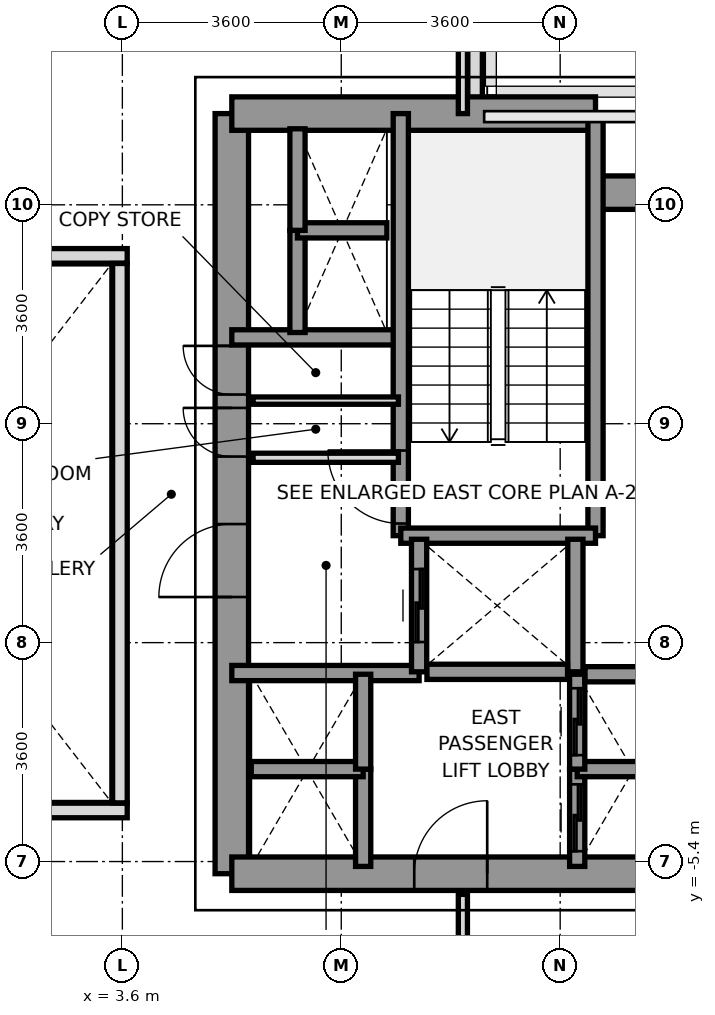
"""IFC4 building model, lengths in metres.
Left out: names, types, materials, properties, quantities, classifications, styles, units other than length and angle.
Written with IfcOpenShell. Run it as: python <this file> out.ifc"""

import sys

from ifc_helpers import new_model, si_unit, direction, frame, frame_2d, origin, place, context, subcontext, project, spatial, rectangle, extrude, source, transform, mapped, element, fill, save


model = new_model("IFC4")
c1 = context("Model", 3, precision=1e-05, world=origin(), true_north=direction((0.0, 1.0)))
c2 = subcontext(c1, "Body", "Model", "MODEL_VIEW")
j1 = project(units=[si_unit("LENGTHUNIT", "METRE"), si_unit("PLANEANGLEUNIT", "RADIAN")], contexts=[c1])
p1 = place(None, origin())
s1 = spatial("IfcSite", under=j1, at=p1, CompositionType="ELEMENT")
p2 = place(p1, origin())
s2 = spatial("IfcBuilding", under=s1, at=p2, CompositionType="ELEMENT")
p3 = place(p2, frame((0.0, 0.0, 57.8)))
s3 = spatial("IfcBuildingStorey", under=s2, at=p3, CompositionType="ELEMENT", Elevation=57.8)
p4 = place(p3, frame((9.4, 8.397, 0.0), z_axis=(0.0, 0.0, 1.0), x_axis=(0.0, -1.0, 0.0)))
e1 = element("IfcWall", 1, at=p4, inside=s3, PredefinedType="PARAPET", context=c2, shape_type="SweptSolid", body=[
    extrude(rectangle(XDim=1.444, YDim=0.24, at=frame_2d((0.722, 0.0))), origin(), (0.0, 0.0, 1.0), 1.15),
])
p5 = place(p3, frame((5.4, -5.6, 0.0), z_axis=(0.0, 0.0, 1.0), x_axis=(0.0, 1.0, 0.0)))
e2 = element("IfcWall", 2, at=p5, inside=s3, PredefinedType="SHEAR", context=c2, shape_type="SweptSolid", body=[
    extrude(rectangle(XDim=12.5, YDim=0.55, at=frame_2d((6.25, 0.0))), origin(), (0.0, 0.0, 1.0), 3.2),
])
p6 = place(p5, frame((4.55, 0.0, 0.0)))
e3 = element("IfcOpeningElement", 3, at=p6, cuts=e2, PredefinedType="OPENING", context=c2, shape_type="SweptSolid", body=[
    extrude(rectangle(XDim=1.2, YDim=2.2, at=frame_2d((0.6, 1.1))), frame((0.0, 0.285, 0.0), z_axis=(0.0, -1.0, 0.0), x_axis=(1.0, 0.0, 0.0)), (0.0, 0.0, 1.0), 0.57),
])
p7 = place(p5, frame((6.86, 0.0, 0.0)))
e4 = element("IfcOpeningElement", 4, at=p7, cuts=e2, PredefinedType="OPENING", context=c2, shape_type="SweptSolid", body=[
    extrude(rectangle(XDim=0.8, YDim=2.1, at=frame_2d((0.4, 1.05))), frame((0.0, 0.285, 0.0), z_axis=(0.0, -1.0, 0.0), x_axis=(1.0, 0.0, 0.0)), (0.0, 0.0, 1.0), 0.57),
])
p8 = place(p5, frame((7.88, 0.0, 0.0)))
e5 = element("IfcOpeningElement", 5, at=p8, cuts=e2, PredefinedType="OPENING", context=c2, shape_type="SweptSolid", body=[
    extrude(rectangle(XDim=0.8, YDim=2.1, at=frame_2d((0.4, 1.05))), frame((0.0, 0.285, 0.0), z_axis=(0.0, -1.0, 0.0), x_axis=(1.0, 0.0, 0.0)), (0.0, 0.0, 1.0), 0.57),
])
p9 = place(p3, frame((5.4, 6.9, 0.0), z_axis=(0.0, 0.0, 1.0), x_axis=(1.0, 0.0, 0.0)))
e6 = element("IfcWall", 6, at=p9, inside=s3, PredefinedType="SHEAR", context=c2, shape_type="SweptSolid", body=[
    extrude(rectangle(XDim=5.981, YDim=0.55, at=frame_2d((2.991, 0.0))), origin(), (0.0, 0.0, 1.0), 3.2),
])
p10 = place(p3, frame((11.381, 5.6, 0.0), z_axis=(0.0, 0.0, 1.0), x_axis=(1.0, 0.0, 0.0)))
e7 = element("IfcWall", 7, at=p10, inside=s3, PredefinedType="SHEAR", context=c2, shape_type="SweptSolid", body=[
    extrude(rectangle(XDim=1.819, YDim=0.55, at=frame_2d((0.909, 0.0))), origin(), (0.0, 0.0, 1.0), 3.2),
])
p11 = place(p3, frame((5.4, -5.6, 0.0), z_axis=(0.0, 0.0, 1.0), x_axis=(1.0, 0.0, 0.0)))
e8 = element("IfcWall", 8, at=p11, inside=s3, PredefinedType="SHEAR", context=c2, shape_type="SweptSolid", body=[
    extrude(rectangle(XDim=7.8, YDim=0.55, at=frame_2d((3.9, 0.0))), origin(), (0.0, 0.0, 1.0), 3.2),
])
p12 = place(p11, frame((3.0, 0.0, 0.0)))
e9 = element("IfcOpeningElement", 9, at=p12, cuts=e8, PredefinedType="OPENING", context=c2, shape_type="SweptSolid", body=[
    extrude(rectangle(XDim=1.2, YDim=2.2, at=frame_2d((0.6, 1.1))), frame((0.0, 0.285, 0.0), z_axis=(0.0, -1.0, 0.0), x_axis=(1.0, 0.0, 0.0)), (0.0, 0.0, 1.0), 0.57),
])
p13 = place(p3, frame((5.4, 3.22, 0.0), z_axis=(0.0, 0.0, 1.0), x_axis=(1.0, 0.0, 0.0)))
e10 = element("IfcWall", 10, at=p13, inside=s3, PredefinedType="SOLIDWALL", context=c2, shape_type="SweptSolid", body=[
    extrude(rectangle(XDim=2.78, YDim=0.25, at=frame_2d((1.39, 0.0))), origin(), (0.0, 0.0, 1.0), 3.2),
])
p14 = place(p3, frame((5.4, -2.3, 0.0), z_axis=(0.0, 0.0, 1.0), x_axis=(1.0, 0.0, 0.0)))
e11 = element("IfcWall", 11, at=p14, inside=s3, PredefinedType="SOLIDWALL", context=c2, shape_type="SweptSolid", body=[
    extrude(rectangle(XDim=3.08, YDim=0.25, at=frame_2d((1.54, 0.0))), origin(), (0.0, 0.0, 1.0), 3.2),
])
p15 = place(p3, frame((8.179, -0.041, 0.0), z_axis=(0.0, 0.0, 1.0), x_axis=(0.0, 1.0, 0.0)))
e12 = element("IfcWall", 12, at=p15, inside=s3, PredefinedType="SOLIDWALL", context=c2, shape_type="SweptSolid", body=[
    extrude(rectangle(XDim=6.941, YDim=0.25, at=frame_2d((3.47, 0.0))), origin(), (0.0, 0.0, 1.0), 3.2),
])
p16 = place(p15, frame((0.2, 0.0, 0.0)))
e13 = element("IfcOpeningElement", 13, at=p16, cuts=e12, PredefinedType="OPENING", context=c2, shape_type="SweptSolid", body=[
    extrude(rectangle(XDim=1.2, YDim=2.2, at=frame_2d((0.6, 1.1))), frame((0.0, 0.135, 0.0), z_axis=(0.0, -1.0, 0.0), x_axis=(1.0, 0.0, 0.0)), (0.0, 0.0, 1.0), 0.27),
])
p17 = place(p3, frame((11.381, -0.041, 0.0), z_axis=(0.0, 0.0, 1.0), x_axis=(0.0, 1.0, 0.0)))
e14 = element("IfcWall", 14, at=p17, inside=s3, PredefinedType="SOLIDWALL", context=c2, shape_type="SweptSolid", body=[
    extrude(rectangle(XDim=6.941, YDim=0.25, at=frame_2d((3.47, 0.0))), origin(), (0.0, 0.0, 1.0), 3.2),
])
p18 = place(p3, frame((8.179, -0.041, 0.0), z_axis=(0.0, 0.0, 1.0), x_axis=(1.0, 0.0, 0.0)))
e15 = element("IfcWall", 15, at=p18, inside=s3, PredefinedType="SOLIDWALL", context=c2, shape_type="SweptSolid", body=[
    extrude(rectangle(XDim=3.202, YDim=0.25, at=frame_2d((1.601, 0.0))), origin(), (0.0, 0.0, 1.0), 3.2),
])
p19 = place(p3, frame((8.48, -2.28, 0.0), z_axis=(0.0, 0.0, 1.0), x_axis=(0.0, 1.0, 0.0)))
e16 = element("IfcWall", 16, at=p19, inside=s3, PredefinedType="SOLIDWALL", context=c2, shape_type="SweptSolid", body=[
    extrude(rectangle(XDim=2.18, YDim=0.25, at=frame_2d((1.09, 0.0))), origin(), (0.0, 0.0, 1.0), 3.2),
])
p20 = place(p19, frame((0.49, 0.0, 0.0)))
e17 = element("IfcOpeningElement", 17, at=p20, cuts=e16, PredefinedType="OPENING", context=c2, shape_type="SweptSolid", body=[
    extrude(rectangle(XDim=1.2, YDim=2.2, at=frame_2d((0.6, 1.1))), frame((0.0, 0.135, 0.0), z_axis=(0.0, -1.0, 0.0), x_axis=(1.0, 0.0, 0.0)), (0.0, 0.0, 1.0), 0.27),
])
p21 = place(p3, frame((11.05, -2.28, 0.0), z_axis=(0.0, 0.0, 1.0), x_axis=(0.0, 1.0, 0.0)))
e18 = element("IfcWall", 18, at=p21, inside=s3, PredefinedType="SOLIDWALL", context=c2, shape_type="SweptSolid", body=[
    extrude(rectangle(XDim=2.18, YDim=0.25, at=frame_2d((1.09, 0.0))), origin(), (0.0, 0.0, 1.0), 3.2),
])
p22 = place(p3, frame((8.609, -2.28, 0.0), z_axis=(0.0, 0.0, 1.0), x_axis=(1.0, 0.0, 0.0)))
e19 = element("IfcWall", 19, at=p22, inside=s3, PredefinedType="SOLIDWALL", context=c2, shape_type="SweptSolid", body=[
    extrude(rectangle(XDim=2.312, YDim=0.25, at=frame_2d((1.156, 0.0))), origin(), (0.0, 0.0, 1.0), 3.2),
])
p23 = place(p3, frame((11.08, -5.48, 0.0), z_axis=(0.0, 0.0, 1.0), x_axis=(0.0, 1.0, 0.0)))
e20 = element("IfcWall", 20, at=p23, inside=s3, PredefinedType="SOLIDWALL", context=c2, shape_type="SweptSolid", body=[
    extrude(rectangle(XDim=1.6, YDim=0.25, at=frame_2d((0.8, 0.0))), origin(), (0.0, 0.0, 1.0), 3.2),
])
p24 = place(p23, frame((0.25, 0.0, 0.0)))
e21 = element("IfcOpeningElement", 21, at=p24, cuts=e20, PredefinedType="OPENING", context=c2, shape_type="SweptSolid", body=[
    extrude(rectangle(XDim=1.1, YDim=2.2, at=frame_2d((0.55, 1.1))), frame((0.0, 0.135, 0.0), z_axis=(0.0, -1.0, 0.0), x_axis=(1.0, 0.0, 0.0)), (0.0, 0.0, 1.0), 0.27),
])
p25 = place(p3, frame((11.08, -3.88, 0.0), z_axis=(0.0, 0.0, 1.0), x_axis=(1.0, 0.0, 0.0)))
e22 = element("IfcWall", 22, at=p25, inside=s3, PredefinedType="SOLIDWALL", context=c2, shape_type="SweptSolid", body=[
    extrude(rectangle(XDim=1.84, YDim=0.25, at=frame_2d((0.92, 0.0))), origin(), (0.0, 0.0, 1.0), 3.2),
])
p26 = place(p3, frame((11.08, -3.88, 0.0), z_axis=(0.0, 0.0, 1.0), x_axis=(0.0, 1.0, 0.0)))
e23 = element("IfcWall", 23, at=p26, inside=s3, PredefinedType="SOLIDWALL", context=c2, shape_type="SweptSolid", body=[
    extrude(rectangle(XDim=1.56, YDim=0.25, at=frame_2d((0.78, 0.0))), origin(), (0.0, 0.0, 1.0), 3.2),
])
p27 = place(p26, frame((0.23, 0.0, 0.0)))
e24 = element("IfcOpeningElement", 24, at=p27, cuts=e23, PredefinedType="OPENING", context=c2, shape_type="SweptSolid", body=[
    extrude(rectangle(XDim=1.1, YDim=2.2, at=frame_2d((0.55, 1.1))), frame((0.0, 0.135, 0.0), z_axis=(0.0, -1.0, 0.0), x_axis=(1.0, 0.0, 0.0)), (0.0, 0.0, 1.0), 0.27),
])
p28 = place(p3, frame((11.209, -2.32, 0.0), z_axis=(0.0, 0.0, 1.0), x_axis=(1.0, 0.0, 0.0)))
e25 = element("IfcWall", 25, at=p28, inside=s3, PredefinedType="SOLIDWALL", context=c2, shape_type="SweptSolid", body=[
    extrude(rectangle(XDim=1.582, YDim=0.25, at=frame_2d((0.791, 0.0))), origin(), (0.0, 0.0, 1.0), 3.2),
])
p29 = place(p3, frame((7.56, -5.48, 0.0), z_axis=(0.0, 0.0, 1.0), x_axis=(0.0, 1.0, 0.0)))
e26 = element("IfcWall", 26, at=p29, inside=s3, PredefinedType="SOLIDWALL", context=c2, shape_type="SweptSolid", body=[
    extrude(rectangle(XDim=1.6, YDim=0.25, at=frame_2d((0.8, 0.0))), origin(), (0.0, 0.0, 1.0), 3.2),
])
p30 = place(p3, frame((5.72, -3.88, 0.0), z_axis=(0.0, 0.0, 1.0), x_axis=(1.0, 0.0, 0.0)))
e27 = element("IfcWall", 27, at=p30, inside=s3, PredefinedType="SOLIDWALL", context=c2, shape_type="SweptSolid", body=[
    extrude(rectangle(XDim=1.84, YDim=0.25, at=frame_2d((0.92, 0.0))), origin(), (0.0, 0.0, 1.0), 3.2),
])
p31 = place(p3, frame((7.56, -3.88, 0.0), z_axis=(0.0, 0.0, 1.0), x_axis=(0.0, 1.0, 0.0)))
e28 = element("IfcWall", 28, at=p31, inside=s3, PredefinedType="SOLIDWALL", context=c2, shape_type="SweptSolid", body=[
    extrude(rectangle(XDim=1.56, YDim=0.25, at=frame_2d((0.78, 0.0))), origin(), (0.0, 0.0, 1.0), 3.2),
])
p32 = place(p3, frame((6.48, 3.3, 0.0), z_axis=(0.0, 0.0, 1.0), x_axis=(0.0, 1.0, 0.0)))
e29 = element("IfcWall", 29, at=p32, inside=s3, PredefinedType="SOLIDWALL", context=c2, shape_type="SweptSolid", body=[
    extrude(rectangle(XDim=1.68, YDim=0.25, at=frame_2d((0.84, 0.0))), origin(), (0.0, 0.0, 1.0), 3.2),
])
p33 = place(p3, frame((6.48, 4.98, 0.0), z_axis=(0.0, 0.0, 1.0), x_axis=(1.0, 0.0, 0.0)))
e30 = element("IfcWall", 30, at=p33, inside=s3, PredefinedType="SOLIDWALL", context=c2, shape_type="SweptSolid", body=[
    extrude(rectangle(XDim=1.47, YDim=0.25, at=frame_2d((0.735, 0.0))), origin(), (0.0, 0.0, 1.0), 3.2),
])
p34 = place(p3, frame((6.48, 4.98, 0.0), z_axis=(0.0, 0.0, 1.0), x_axis=(0.0, 1.0, 0.0)))
e31 = element("IfcWall", 31, at=p34, inside=s3, PredefinedType="SOLIDWALL", context=c2, shape_type="SweptSolid", body=[
    extrude(rectangle(XDim=1.67, YDim=0.25, at=frame_2d((0.835, 0.0))), origin(), (0.0, 0.0, 1.0), 3.2),
])
p35 = place(p3, frame((5.75, 1.24, 0.0), z_axis=(0.0, 0.0, 1.0), x_axis=(1.0, 0.0, 0.0)))
e32 = element("IfcWall", 32, at=p35, inside=s3, PredefinedType="PARTITIONING", context=c2, shape_type="SweptSolid", body=[
    extrude(rectangle(XDim=2.39, YDim=0.15, at=frame_2d((1.195, 0.0))), origin(), (0.0, 0.0, 1.0), 2.3),
])
p36 = place(p3, frame((5.75, 2.18, 0.0), z_axis=(0.0, 0.0, 1.0), x_axis=(1.0, 0.0, 0.0)))
e33 = element("IfcWall", 33, at=p36, inside=s3, PredefinedType="PARTITIONING", context=c2, shape_type="SweptSolid", body=[
    extrude(rectangle(XDim=2.39, YDim=0.12, at=frame_2d((1.195, 0.0))), origin(), (0.0, 0.0, 1.0), 2.3),
])
p37 = place(p3, frame((9.2, 6.9, 0.0), z_axis=(0.0, 0.0, 1.0), x_axis=(0.0, 1.0, 0.0)))
e34 = element("IfcWall", 34, at=p37, inside=s3, PredefinedType="PARTITIONING", context=c2, shape_type="SweptSolid", body=[
    extrude(rectangle(XDim=8.78, YDim=0.15, at=frame_2d((4.39, 0.0))), origin(), (0.0, 0.0, 1.0), 2.65),
])
p38 = place(p3, frame((9.2, -15.68, 0.0), z_axis=(0.0, 0.0, 1.0), x_axis=(0.0, 1.0, 0.0)))
e35 = element("IfcWall", 35, at=p38, inside=s3, PredefinedType="PARTITIONING", context=c2, shape_type="SweptSolid", body=[
    extrude(rectangle(XDim=9.74, YDim=0.15, at=frame_2d((4.87, 0.0))), origin(), (0.0, 0.0, 1.0), 2.65),
])
for number, where, z_axis, x_axis in (
    (36, (-3.68, -4.56, 0.0), (0.0, 0.0, 1.0), (1.0, 0.0, 0.0)),
    (37, (-3.68, 4.56, 0.0), (0.0, 0.0, 1.0), (1.0, 0.0, 0.0)),
):
    element("IfcWall", number, at=place(p3, frame(where, z_axis=z_axis, x_axis=x_axis)), inside=s3, PredefinedType="PARAPET", context=c2, shape_type="SweptSolid", body=[
        extrude(rectangle(XDim=7.36, YDim=0.24, at=frame_2d((3.68, 0.0))), origin(), (0.0, 0.0, 1.0), 1.15),
    ])
p39 = place(p3, frame((3.56, -4.435, 0.0), z_axis=(0.0, 0.0, 1.0), x_axis=(0.0, 1.0, 0.0)))
e38 = element("IfcWall", 38, at=p39, inside=s3, PredefinedType="PARAPET", context=c2, shape_type="SweptSolid", body=[
    extrude(rectangle(XDim=8.87, YDim=0.24, at=frame_2d((4.435, 0.0))), origin(), (0.0, 0.0, 1.0), 1.15),
])
m1 = source(origin(), c2, "Body", "SweptSolid", [
    extrude(rectangle(XDim=1.2, YDim=2.2, at=frame_2d((0.6, 1.1))), frame((0.0, 0.025, 0.0), z_axis=(0.0, -1.0, 0.0), x_axis=(1.0, 0.0, 0.0)), (0.0, 0.0, 1.0), 0.05),
])
p40 = place(p16, origin())
e39 = element("IfcDoor", 39, at=p40, inside=s3, OperationType="SINGLE_SWING_RIGHT", PredefinedType="DOOR", context=c2, shape_type="MappedRepresentation", body=[
    mapped(m1, transform((0.0, 0.0, 0.0), x_axis=(1.0, 0.0, 0.0), y_axis=(0.0, 1.0, 0.0), z_axis=(0.0, 0.0, 1.0), scale=1.0)),
])
fill(e13, e39)
p41 = place(p6, origin())
e40 = element("IfcDoor", 40, at=p41, inside=s3, OperationType="SINGLE_SWING_LEFT", PredefinedType="DOOR", context=c2, shape_type="MappedRepresentation", body=[
    mapped(m1, transform((0.0, 0.0, 0.0), x_axis=(1.0, 0.0, 0.0), y_axis=(0.0, 1.0, 0.0), z_axis=(0.0, 0.0, 1.0), scale=1.0)),
])
fill(e3, e40)
p42 = place(p12, origin())
e41 = element("IfcDoor", 41, at=p42, inside=s3, OperationType="SINGLE_SWING_RIGHT", PredefinedType="DOOR", context=c2, shape_type="MappedRepresentation", body=[
    mapped(m1, transform((0.0, 0.0, 0.0), x_axis=(1.0, 0.0, 0.0), y_axis=(0.0, 1.0, 0.0), z_axis=(0.0, 0.0, 1.0), scale=1.0)),
])
fill(e9, e41)
m2 = source(origin(), c2, "Body", "SweptSolid", [
    extrude(rectangle(XDim=0.8, YDim=2.1, at=frame_2d((0.4, 1.05))), frame((0.0, 0.025, 0.0), z_axis=(0.0, -1.0, 0.0), x_axis=(1.0, 0.0, 0.0)), (0.0, 0.0, 1.0), 0.05),
])
p43 = place(p7, origin())
e42 = element("IfcDoor", 42, at=p43, inside=s3, OperationType="SINGLE_SWING_RIGHT", PredefinedType="DOOR", context=c2, shape_type="MappedRepresentation", body=[
    mapped(m2, transform((0.0, 0.0, 0.0), x_axis=(1.0, 0.0, 0.0), y_axis=(0.0, 1.0, 0.0), z_axis=(0.0, 0.0, 1.0), scale=1.0)),
])
fill(e4, e42)
p44 = place(p8, origin())
e43 = element("IfcDoor", 43, at=p44, inside=s3, OperationType="SINGLE_SWING_RIGHT", PredefinedType="DOOR", context=c2, shape_type="MappedRepresentation", body=[
    mapped(m2, transform((0.0, 0.0, 0.0), x_axis=(1.0, 0.0, 0.0), y_axis=(0.0, 1.0, 0.0), z_axis=(0.0, 0.0, 1.0), scale=1.0)),
])
fill(e5, e43)
p45 = place(p20, origin())
e44 = element("IfcDoor", 44, at=p45, inside=s3, OperationType="SLIDING_TO_RIGHT", PredefinedType="DOOR", context=c2, shape_type="MappedRepresentation", body=[
    mapped(m1, transform((0.0, 0.0, 0.0), x_axis=(1.0, 0.0, 0.0), y_axis=(0.0, 1.0, 0.0), z_axis=(0.0, 0.0, 1.0), scale=1.0)),
])
fill(e17, e44)
m3 = source(origin(), c2, "Body", "SweptSolid", [
    extrude(rectangle(XDim=1.1, YDim=2.2, at=frame_2d((0.55, 1.1))), frame((0.0, 0.025, 0.0), z_axis=(0.0, -1.0, 0.0), x_axis=(1.0, 0.0, 0.0)), (0.0, 0.0, 1.0), 0.05),
])
p46 = place(p24, origin())
e45 = element("IfcDoor", 45, at=p46, inside=s3, OperationType="SLIDING_TO_LEFT", PredefinedType="DOOR", context=c2, shape_type="MappedRepresentation", body=[
    mapped(m3, transform((0.0, 0.0, 0.0), x_axis=(1.0, 0.0, 0.0), y_axis=(0.0, 1.0, 0.0), z_axis=(0.0, 0.0, 1.0), scale=1.0)),
])
fill(e21, e45)
p47 = place(p27, origin())
e46 = element("IfcDoor", 46, at=p47, inside=s3, OperationType="SLIDING_TO_LEFT", PredefinedType="DOOR", context=c2, shape_type="MappedRepresentation", body=[
    mapped(m3, transform((0.0, 0.0, 0.0), x_axis=(1.0, 0.0, 0.0), y_axis=(0.0, 1.0, 0.0), z_axis=(0.0, 0.0, 1.0), scale=1.0)),
])
fill(e24, e46)
save(model, sys.argv[1])
